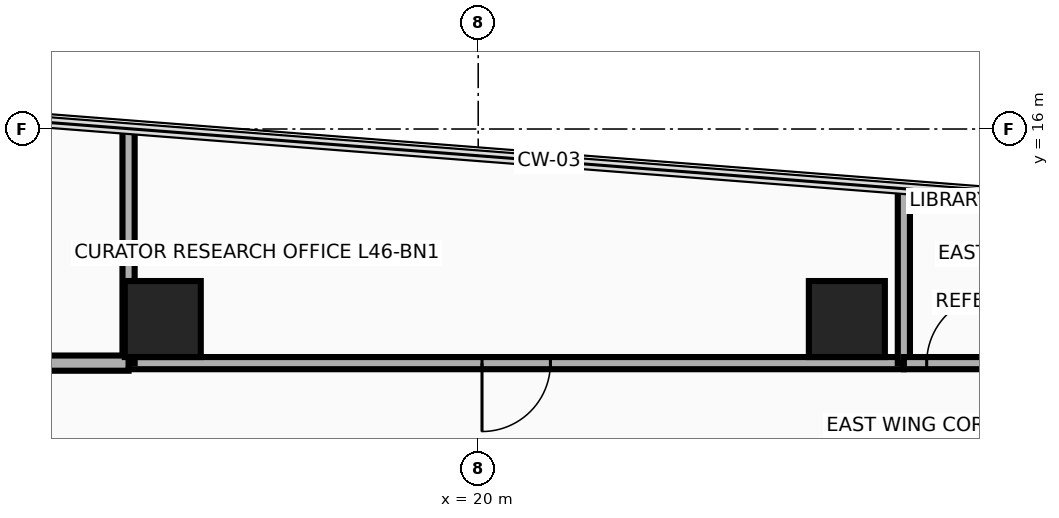
"""IFC4 building model, lengths in metres.
Left out: names, types, materials, properties, quantities, classifications, styles, units other than length and angle.
Written with IfcOpenShell. Run it as: python <this file> out.ifc"""

import sys

from ifc_helpers import new_model, si_unit, direction, frame, frame_2d, origin, origin_2d, place, context, subcontext, project, spatial, rectangle, extrude, source, transform, mapped, element, fill, save


model = new_model("IFC4")
c1 = context("Model", 3, precision=1e-05, world=origin(), true_north=direction((0.0, 1.0)))
c2 = subcontext(c1, "Body", "Model", "MODEL_VIEW")
j1 = project(units=[si_unit("LENGTHUNIT", "METRE"), si_unit("PLANEANGLEUNIT", "RADIAN")], contexts=[c1])
p1 = place(None, origin())
s1 = spatial("IfcSite", under=j1, at=p1, CompositionType="ELEMENT")
p2 = place(p1, origin())
s2 = spatial("IfcBuilding", under=s1, at=p2, CompositionType="ELEMENT")
p3 = place(p2, frame((0.0, 0.0, 180.5)))
s3 = spatial("IfcBuildingStorey", under=s2, at=p3, CompositionType="ELEMENT", Elevation=180.5)
m1 = source(origin(), c2, "Body", "SweptSolid", [
    extrude(rectangle(XDim=1.0, YDim=1.0, at=origin_2d()), origin(), (0.0, 0.0, 1.0), 3.95),
])
for number, where, z_axis, x_axis in (
    (1, (15.85, 13.5, 0.0), (0.0, 0.0, 1.0), (1.0, 0.0, 0.0)),
    (2, (24.85, 13.5, 0.0), (0.0, 0.0, 1.0), (1.0, 0.0, 0.0)),
):
    element("IfcColumn", number, at=place(p3, frame(where, z_axis=z_axis, x_axis=x_axis)), inside=s3, PredefinedType="COLUMN", context=c2, shape_type="MappedRepresentation", body=[
        mapped(m1, transform((0.0, 0.0, 0.0), x_axis=(1.0, 0.0, 0.0), y_axis=(0.0, 1.0, 0.0), z_axis=(0.0, 0.0, 1.0), scale=1.0)),
    ])
p4 = place(p3, frame((15.4, 12.92, 0.0), z_axis=(0.0, 0.0, 1.0), x_axis=(1.0, 0.0, 0.0)))
e3 = element("IfcWall", 3, at=p4, inside=s3, PredefinedType="PARTITIONING", context=c2, shape_type="SweptSolid", body=[
    extrude(rectangle(XDim=10.2, YDim=0.16, at=frame_2d((5.1, 0.0))), origin(), (0.0, 0.0, 1.0), 3.004),
])
p5 = place(p4, frame((4.65, 0.0, 0.0)))
e4 = element("IfcOpeningElement", 4, at=p5, cuts=e3, PredefinedType="OPENING", context=c2, shape_type="SweptSolid", body=[
    extrude(rectangle(XDim=0.9, YDim=2.1, at=frame_2d((0.45, 1.05))), frame((0.0, 0.095, 0.0), z_axis=(0.0, -1.0, 0.0), x_axis=(1.0, 0.0, 0.0)), (0.0, 0.0, 1.0), 0.19),
])
p6 = place(p3, frame((15.4, 12.92, 0.0), z_axis=(0.0, 0.0, 1.0), x_axis=(0.0, 1.0, 0.0)))
e5 = element("IfcWall", 5, at=p6, inside=s3, PredefinedType="PARTITIONING", context=c2, shape_type="SweptSolid", body=[
    extrude(rectangle(XDim=3.084, YDim=0.16, at=frame_2d((1.542, 0.0))), origin(), (0.0, 0.0, 1.0), 2.665),
])
p7 = place(p3, frame((25.6, 12.92, 0.0), z_axis=(0.0, 0.0, 1.0), x_axis=(0.0, 1.0, 0.0)))
e6 = element("IfcWall", 6, at=p7, inside=s3, PredefinedType="PARTITIONING", context=c2, shape_type="SweptSolid", body=[
    extrude(rectangle(XDim=2.295, YDim=0.16, at=frame_2d((1.147, 0.0))), origin(), (0.0, 0.0, 1.0), 2.665),
])
p8 = place(p3, frame((25.6, 12.92, 0.0), z_axis=(0.0, 0.0, 1.0), x_axis=(1.0, 0.0, 0.0)))
e7 = element("IfcWall", 7, at=p8, inside=s3, PredefinedType="PARTITIONING", context=c2, shape_type="SweptSolid", body=[
    extrude(rectangle(XDim=3.934, YDim=0.16, at=frame_2d((1.967, 0.0))), origin(), (0.0, 0.0, 1.0), 3.076),
])
p9 = place(p8, frame((0.3, 0.0, 0.0)))
e8 = element("IfcOpeningElement", 8, at=p9, cuts=e7, PredefinedType="OPENING", context=c2, shape_type="SweptSolid", body=[
    extrude(rectangle(XDim=0.9, YDim=2.1, at=frame_2d((0.45, 1.05))), frame((0.0, 0.095, 0.0), z_axis=(0.0, -1.0, 0.0), x_axis=(1.0, 0.0, 0.0)), (0.0, 0.0, 1.0), 0.19),
])
p10 = place(p3, frame((13.42, 12.92, 0.0), z_axis=(0.0, 0.0, 1.0), x_axis=(1.0, 0.0, 0.0)))
e9 = element("IfcWall", 9, at=p10, inside=s3, PredefinedType="PARTITIONING", context=c2, shape_type="SweptSolid", body=[
    extrude(rectangle(XDim=1.98, YDim=0.2, at=frame_2d((0.99, 0.0))), origin(), (0.0, 0.0, 1.0), 3.004),
])
p11 = place(p5, frame((0.9, 0.0, 0.0), z_axis=(0.0, 0.0, 1.0), x_axis=(-1.0, 0.0, 0.0)))
e10 = element("IfcDoor", 10, at=p11, inside=s3, OperationType="SINGLE_SWING_LEFT", PredefinedType="DOOR", context=c2, shape_type="SweptSolid", body=[
    extrude(rectangle(XDim=0.9, YDim=2.1, at=frame_2d((0.45, 1.05))), frame((0.0, 0.025, 0.0), z_axis=(0.0, -1.0, 0.0), x_axis=(1.0, 0.0, 0.0)), (0.0, 0.0, 1.0), 0.05),
])
fill(e4, e10)
p12 = place(p9, origin())
e11 = element("IfcDoor", 11, at=p12, inside=s3, OperationType="SINGLE_SWING_LEFT", PredefinedType="DOOR", context=c2, shape_type="SweptSolid", body=[
    extrude(rectangle(XDim=0.9, YDim=2.1, at=frame_2d((0.45, 1.05))), frame((0.0, 0.025, 0.0), z_axis=(0.0, -1.0, 0.0), x_axis=(1.0, 0.0, 0.0)), (0.0, 0.0, 1.0), 0.05),
])
fill(e8, e11)
save(model, sys.argv[1])
